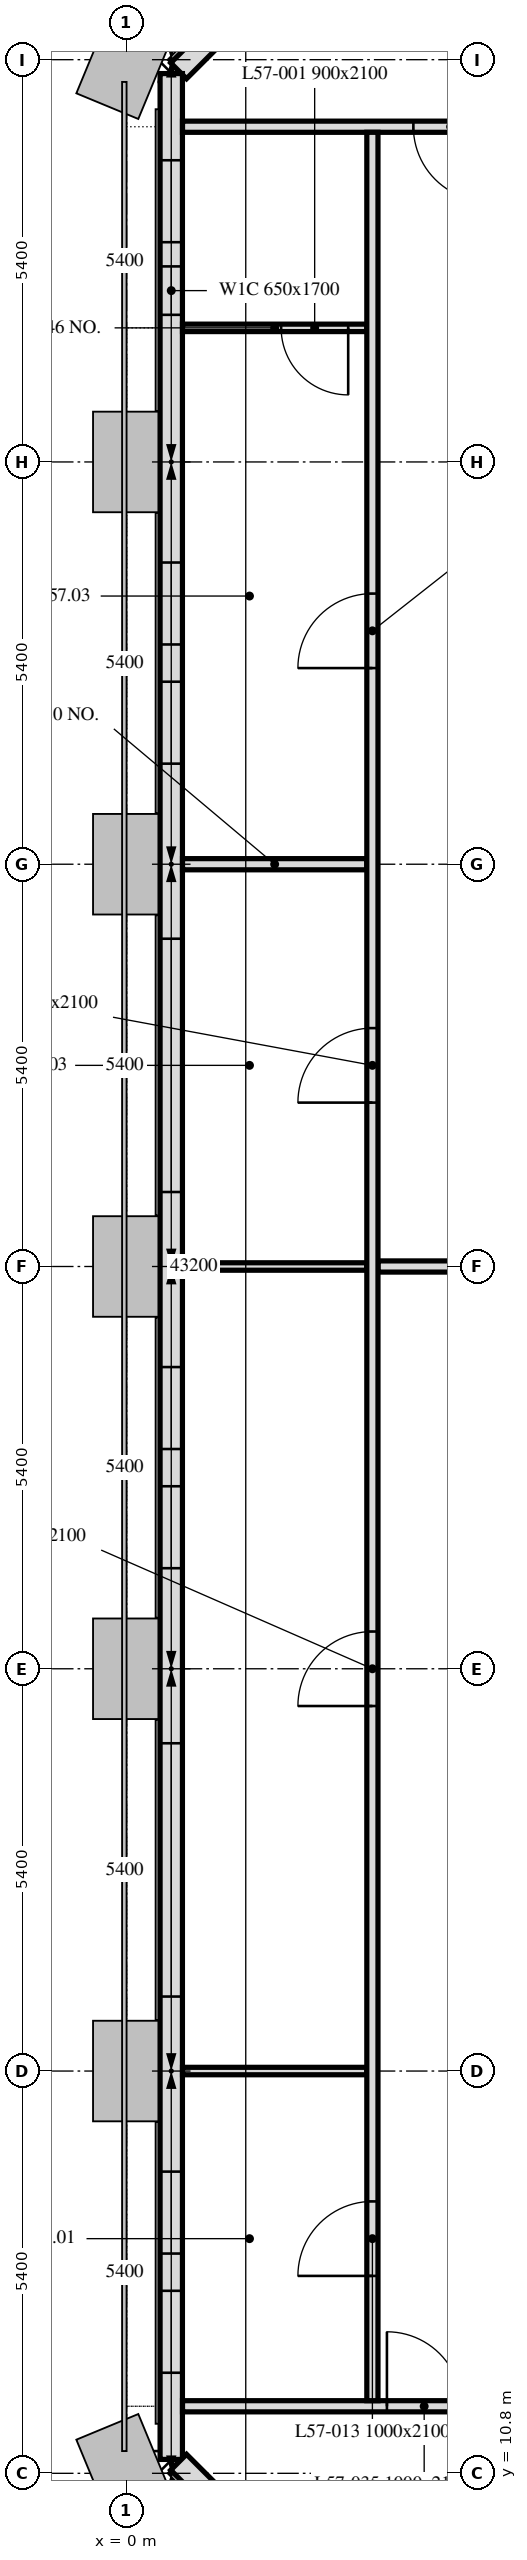
"""IFC4 building model, lengths in metres.
Left out: names, types, materials, properties, quantities, classifications, styles, units other than length and angle.
Written with IfcOpenShell. Run it as: python <this file> out.ifc"""

import sys

from ifc_helpers import new_model, si_unit, direction, frame, frame_2d, origin, place, context, subcontext, project, spatial, rectangle, extrude, element, fill, save


model = new_model("IFC4")
c1 = context("Model", 3, precision=1e-05, world=origin(), true_north=direction((0.0, 1.0)))
c2 = subcontext(c1, "Body", "Model", "MODEL_VIEW")
j1 = project(units=[si_unit("LENGTHUNIT", "METRE"), si_unit("PLANEANGLEUNIT", "RADIAN")], contexts=[c1])
p1 = place(None, origin())
s1 = spatial("IfcSite", under=j1, at=p1, CompositionType="ELEMENT")
p2 = place(p1, origin())
s2 = spatial("IfcBuilding", under=s1, at=p2, CompositionType="ELEMENT")
p3 = place(p2, frame((0.0, 0.0, 226.9)))
s3 = spatial("IfcBuildingStorey", under=s2, at=p3, CompositionType="ELEMENT", Elevation=226.9)
p4 = place(p3, frame((5.55, 47.901, 0.0), z_axis=(0.0, 0.0, 1.0), x_axis=(-0.707106781187, -0.707106781187, 0.0)))
e1 = element("IfcWall", 1, at=p4, inside=s3, PredefinedType="SOLIDWALL", context=c2, shape_type="SweptSolid", body=[
    extrude(rectangle(XDim=6.86, YDim=0.3, at=frame_2d((3.43, 0.0))), origin(), (0.0, 0.0, 1.0), 3.0),
])
p5 = place(p4, frame((1.73, 0.0, 0.9)))
e2 = element("IfcOpeningElement", 2, at=p5, cuts=e1, PredefinedType="OPENING", context=c2, shape_type="SweptSolid", body=[
    extrude(rectangle(XDim=3.4, YDim=1.7, at=frame_2d((1.7, 0.85))), frame((0.0, 0.16, 0.0), z_axis=(0.0, -1.0, 0.0), x_axis=(1.0, 0.0, 0.0)), (0.0, 0.0, 1.0), 0.32),
])
p6 = place(p3, frame((0.6, 43.014, 0.0), z_axis=(0.0, 0.0, 1.0), x_axis=(0.0, -1.0, 0.0)))
e3 = element("IfcWall", 3, at=p6, inside=s3, PredefinedType="SOLIDWALL", context=c2, shape_type="SweptSolid", body=[
    extrude(rectangle(XDim=32.027, YDim=0.3, at=frame_2d((16.014, 0.0))), origin(), (0.0, 0.0, 1.0), 3.0),
])
p7 = place(p6, frame((1.164, 0.0, 0.9)))
e4 = element("IfcOpeningElement", 4, at=p7, cuts=e3, PredefinedType="OPENING", context=c2, shape_type="SweptSolid", body=[
    extrude(rectangle(XDim=1.1, YDim=1.7, at=frame_2d((0.55, 0.85))), frame((0.0, 0.16, 0.0), z_axis=(0.0, -1.0, 0.0), x_axis=(1.0, 0.0, 0.0)), (0.0, 0.0, 1.0), 0.32),
])
p8 = place(p6, frame((2.589, 0.0, 0.9)))
e5 = element("IfcOpeningElement", 5, at=p8, cuts=e3, PredefinedType="OPENING", context=c2, shape_type="SweptSolid", body=[
    extrude(rectangle(XDim=0.65, YDim=1.7, at=frame_2d((0.325, 0.85))), frame((0.0, 0.16, 0.0), z_axis=(0.0, -1.0, 0.0), x_axis=(1.0, 0.0, 0.0)), (0.0, 0.0, 1.0), 0.32),
])
p9 = place(p6, frame((6.564, 0.0, 0.9)))
e6 = element("IfcOpeningElement", 6, at=p9, cuts=e3, PredefinedType="OPENING", context=c2, shape_type="SweptSolid", body=[
    extrude(rectangle(XDim=1.1, YDim=1.7, at=frame_2d((0.55, 0.85))), frame((0.0, 0.16, 0.0), z_axis=(0.0, -1.0, 0.0), x_axis=(1.0, 0.0, 0.0)), (0.0, 0.0, 1.0), 0.32),
])
p10 = place(p6, frame((8.164, 0.0, 0.9)))
e7 = element("IfcOpeningElement", 7, at=p10, cuts=e3, PredefinedType="OPENING", context=c2, shape_type="SweptSolid", body=[
    extrude(rectangle(XDim=1.1, YDim=1.7, at=frame_2d((0.55, 0.85))), frame((0.0, 0.16, 0.0), z_axis=(0.0, -1.0, 0.0), x_axis=(1.0, 0.0, 0.0)), (0.0, 0.0, 1.0), 0.32),
])
p11 = place(p6, frame((11.614, 0.0, 0.9)))
e8 = element("IfcOpeningElement", 8, at=p11, cuts=e3, PredefinedType="OPENING", context=c2, shape_type="SweptSolid", body=[
    extrude(rectangle(XDim=3.4, YDim=1.7, at=frame_2d((1.7, 0.85))), frame((0.0, 0.16, 0.0), z_axis=(0.0, -1.0, 0.0), x_axis=(1.0, 0.0, 0.0)), (0.0, 0.0, 1.0), 0.32),
])
p12 = place(p6, frame((17.364, 0.0, 0.9)))
e9 = element("IfcOpeningElement", 9, at=p12, cuts=e3, PredefinedType="OPENING", context=c2, shape_type="SweptSolid", body=[
    extrude(rectangle(XDim=1.1, YDim=1.7, at=frame_2d((0.55, 0.85))), frame((0.0, 0.16, 0.0), z_axis=(0.0, -1.0, 0.0), x_axis=(1.0, 0.0, 0.0)), (0.0, 0.0, 1.0), 0.32),
])
p13 = place(p6, frame((18.964, 0.0, 0.9)))
e10 = element("IfcOpeningElement", 10, at=p13, cuts=e3, PredefinedType="OPENING", context=c2, shape_type="SweptSolid", body=[
    extrude(rectangle(XDim=1.1, YDim=1.7, at=frame_2d((0.55, 0.85))), frame((0.0, 0.16, 0.0), z_axis=(0.0, -1.0, 0.0), x_axis=(1.0, 0.0, 0.0)), (0.0, 0.0, 1.0), 0.32),
])
p14 = place(p6, frame((22.414, 0.0, 0.9)))
e11 = element("IfcOpeningElement", 11, at=p14, cuts=e3, PredefinedType="OPENING", context=c2, shape_type="SweptSolid", body=[
    extrude(rectangle(XDim=3.4, YDim=1.7, at=frame_2d((1.7, 0.85))), frame((0.0, 0.16, 0.0), z_axis=(0.0, -1.0, 0.0), x_axis=(1.0, 0.0, 0.0)), (0.0, 0.0, 1.0), 0.32),
])
p15 = place(p6, frame((28.164, 0.0, 0.9)))
e12 = element("IfcOpeningElement", 12, at=p15, cuts=e3, PredefinedType="OPENING", context=c2, shape_type="SweptSolid", body=[
    extrude(rectangle(XDim=1.1, YDim=1.7, at=frame_2d((0.55, 0.85))), frame((0.0, 0.16, 0.0), z_axis=(0.0, -1.0, 0.0), x_axis=(1.0, 0.0, 0.0)), (0.0, 0.0, 1.0), 0.32),
])
p16 = place(p6, frame((29.764, 0.0, 0.9)))
e13 = element("IfcOpeningElement", 13, at=p16, cuts=e3, PredefinedType="OPENING", context=c2, shape_type="SweptSolid", body=[
    extrude(rectangle(XDim=1.1, YDim=1.7, at=frame_2d((0.55, 0.85))), frame((0.0, 0.16, 0.0), z_axis=(0.0, -1.0, 0.0), x_axis=(1.0, 0.0, 0.0)), (0.0, 0.0, 1.0), 0.32),
])
p17 = place(p3, frame((0.699, 10.949, 0.0), z_axis=(0.0, 0.0, 1.0), x_axis=(0.707106781187, -0.707106781187, 0.0)))
e14 = element("IfcWall", 14, at=p17, inside=s3, PredefinedType="SOLIDWALL", context=c2, shape_type="SweptSolid", body=[
    extrude(rectangle(XDim=6.86, YDim=0.3, at=frame_2d((3.43, 0.0))), origin(), (0.0, 0.0, 1.0), 3.0),
])
p18 = place(p17, frame((1.73, 0.0, 0.9)))
e15 = element("IfcOpeningElement", 15, at=p18, cuts=e14, PredefinedType="OPENING", context=c2, shape_type="SweptSolid", body=[
    extrude(rectangle(XDim=3.4, YDim=1.7, at=frame_2d((1.7, 0.85))), frame((0.0, 0.16, 0.0), z_axis=(0.0, -1.0, 0.0), x_axis=(1.0, 0.0, 0.0)), (0.0, 0.0, 1.0), 0.32),
])
p19 = place(p3, frame((0.751, 32.4, 0.0), z_axis=(0.0, 0.0, 1.0), x_axis=(1.0, 0.0, 0.0)))
e16 = element("IfcWall", 16, at=p19, inside=s3, PredefinedType="PARTITIONING", context=c2, shape_type="SweptSolid", body=[
    extrude(rectangle(XDim=2.474, YDim=0.15, at=frame_2d((1.237, 0.0))), origin(), (0.0, 0.0, 1.0), 2.4),
])
p20 = place(p3, frame((3.225, 39.6, 0.0), z_axis=(0.0, 0.0, 1.0), x_axis=(-1.0, 0.0, 0.0)))
e17 = element("IfcWall", 17, at=p20, inside=s3, PredefinedType="PARTITIONING", context=c2, shape_type="SweptSolid", body=[
    extrude(rectangle(XDim=2.474, YDim=0.1, at=frame_2d((1.237, 0.0))), origin(), (0.0, 0.0, 1.0), 3.0),
])
p21 = place(p20, frame((0.25, 0.0, 0.0)))
e18 = element("IfcOpeningElement", 18, at=p21, cuts=e17, PredefinedType="OPENING", context=c2, shape_type="SweptSolid", body=[
    extrude(rectangle(XDim=0.9, YDim=2.1, at=frame_2d((0.45, 1.05))), frame((0.0, 0.05, 0.0), z_axis=(0.0, -1.0, 0.0), x_axis=(1.0, 0.0, 0.0)), (0.0, 0.0, 1.0), 0.1),
])
p22 = place(p3, frame((42.449, 42.3, 0.0), z_axis=(0.0, 0.0, 1.0), x_axis=(-1.0, 0.0, 0.0)))
e19 = element("IfcWall", 19, at=p22, inside=s3, PredefinedType="PARTITIONING", context=c2, shape_type="SweptSolid", body=[
    extrude(rectangle(XDim=41.698, YDim=0.15, at=frame_2d((20.849, 0.0))), origin(), (0.0, 0.0, 1.0), 2.4),
])
p23 = place(p22, frame((1.132, 0.0, 0.0)))
e20 = element("IfcOpeningElement", 20, at=p23, cuts=e19, PredefinedType="OPENING", context=c2, shape_type="SweptSolid", body=[
    extrude(rectangle(XDim=1.0, YDim=2.1, at=frame_2d((0.5, 1.05))), frame((0.0, 0.075, 0.0), z_axis=(0.0, -1.0, 0.0), x_axis=(1.0, 0.0, 0.0)), (0.0, 0.0, 1.0), 0.15),
])
p24 = place(p22, frame((13.049, 0.0, 0.0)))
e21 = element("IfcOpeningElement", 21, at=p24, cuts=e19, PredefinedType="OPENING", context=c2, shape_type="SweptSolid", body=[
    extrude(rectangle(XDim=1.0, YDim=2.1, at=frame_2d((0.5, 1.05))), frame((0.0, 0.075, 0.0), z_axis=(0.0, -1.0, 0.0), x_axis=(1.0, 0.0, 0.0)), (0.0, 0.0, 1.0), 0.15),
])
p25 = place(p22, frame((18.449, 0.0, 0.0)))
e22 = element("IfcOpeningElement", 22, at=p25, cuts=e19, PredefinedType="OPENING", context=c2, shape_type="SweptSolid", body=[
    extrude(rectangle(XDim=1.0, YDim=2.1, at=frame_2d((0.5, 1.05))), frame((0.0, 0.075, 0.0), z_axis=(0.0, -1.0, 0.0), x_axis=(1.0, 0.0, 0.0)), (0.0, 0.0, 1.0), 0.15),
])
p26 = place(p22, frame((23.049, 0.0, 0.0)))
e23 = element("IfcOpeningElement", 23, at=p26, cuts=e19, PredefinedType="OPENING", context=c2, shape_type="SweptSolid", body=[
    extrude(rectangle(XDim=1.0, YDim=2.1, at=frame_2d((0.5, 1.05))), frame((0.0, 0.075, 0.0), z_axis=(0.0, -1.0, 0.0), x_axis=(1.0, 0.0, 0.0)), (0.0, 0.0, 1.0), 0.15),
])
p27 = place(p22, frame((37.599, 0.0, 0.0)))
e24 = element("IfcOpeningElement", 24, at=p27, cuts=e19, PredefinedType="OPENING", context=c2, shape_type="SweptSolid", body=[
    extrude(rectangle(XDim=1.0, YDim=2.1, at=frame_2d((0.5, 1.05))), frame((0.0, 0.075, 0.0), z_axis=(0.0, -1.0, 0.0), x_axis=(1.0, 0.0, 0.0)), (0.0, 0.0, 1.0), 0.15),
])
p28 = place(p3, frame((0.751, 27.0, 0.0), z_axis=(0.0, 0.0, 1.0), x_axis=(1.0, 0.0, 0.0)))
e25 = element("IfcWall", 25, at=p28, inside=s3, PredefinedType="PARTITIONING", context=c2, shape_type="SweptSolid", body=[
    extrude(rectangle(XDim=2.474, YDim=0.1, at=frame_2d((1.237, 0.0))), origin(), (0.0, 0.0, 1.0), 2.4),
])
p29 = place(p3, frame((3.375, 27.0, 0.0), z_axis=(0.0, 0.0, 1.0), x_axis=(1.0, 0.0, 0.0)))
e26 = element("IfcWall", 26, at=p29, inside=s3, PredefinedType="PARTITIONING", context=c2, shape_type="SweptSolid", body=[
    extrude(rectangle(XDim=2.025, YDim=0.15, at=frame_2d((1.012, 0.0))), origin(), (0.0, 0.0, 1.0), 2.4),
])
p30 = place(p3, frame((3.225, 16.2, 0.0), z_axis=(0.0, 0.0, 1.0), x_axis=(-1.0, 0.0, 0.0)))
e27 = element("IfcWall", 27, at=p30, inside=s3, PredefinedType="PARTITIONING", context=c2, shape_type="SweptSolid", body=[
    extrude(rectangle(XDim=2.474, YDim=0.1, at=frame_2d((1.237, 0.0))), origin(), (0.0, 0.0, 1.0), 2.4),
])
p31 = place(p3, frame((0.751, 11.7, 0.0), z_axis=(0.0, 0.0, 1.0), x_axis=(1.0, 0.0, 0.0)))
e28 = element("IfcWall", 28, at=p31, inside=s3, PredefinedType="PARTITIONING", context=c2, shape_type="SweptSolid", body=[
    extrude(rectangle(XDim=41.698, YDim=0.15, at=frame_2d((20.849, 0.0))), origin(), (0.0, 0.0, 1.0), 3.0),
])
p32 = place(p31, frame((33.866, 0.0, 0.0)))
e29 = element("IfcOpeningElement", 29, at=p32, cuts=e28, PredefinedType="OPENING", context=c2, shape_type="SweptSolid", body=[
    extrude(rectangle(XDim=1.0, YDim=2.1, at=frame_2d((0.5, 1.05))), frame((0.0, 0.075, 0.0), z_axis=(0.0, -1.0, 0.0), x_axis=(1.0, 0.0, 0.0)), (0.0, 0.0, 1.0), 0.15),
])
p33 = place(p31, frame((28.432, 0.0, 0.0)))
e30 = element("IfcOpeningElement", 30, at=p33, cuts=e28, PredefinedType="OPENING", context=c2, shape_type="SweptSolid", body=[
    extrude(rectangle(XDim=1.0, YDim=2.1, at=frame_2d((0.5, 1.05))), frame((0.0, 0.075, 0.0), z_axis=(0.0, -1.0, 0.0), x_axis=(1.0, 0.0, 0.0)), (0.0, 0.0, 1.0), 0.15),
])
p34 = place(p31, frame((12.266, 0.0, 0.0)))
e31 = element("IfcOpeningElement", 31, at=p34, cuts=e28, PredefinedType="OPENING", context=c2, shape_type="SweptSolid", body=[
    extrude(rectangle(XDim=1.0, YDim=2.1, at=frame_2d((0.5, 1.05))), frame((0.0, 0.075, 0.0), z_axis=(0.0, -1.0, 0.0), x_axis=(1.0, 0.0, 0.0)), (0.0, 0.0, 1.0), 0.15),
])
p35 = place(p31, frame((2.744, 0.0, 0.0)))
e32 = element("IfcOpeningElement", 32, at=p35, cuts=e28, PredefinedType="OPENING", context=c2, shape_type="SweptSolid", body=[
    extrude(rectangle(XDim=1.0, YDim=2.1, at=frame_2d((0.5, 1.05))), frame((0.0, 0.075, 0.0), z_axis=(0.0, -1.0, 0.0), x_axis=(1.0, 0.0, 0.0)), (0.0, 0.0, 1.0), 0.15),
])
p36 = place(p3, frame((3.3, 11.775, 0.0), z_axis=(0.0, 0.0, 1.0), x_axis=(0.0, 1.0, 0.0)))
e33 = element("IfcWall", 33, at=p36, inside=s3, PredefinedType="PARTITIONING", context=c2, shape_type="SweptSolid", body=[
    extrude(rectangle(XDim=30.45, YDim=0.15, at=frame_2d((15.225, 0.0))), origin(), (0.0, 0.0, 1.0), 2.4),
])
p37 = place(p36, frame((17.425, 0.0, 0.0)))
e34 = element("IfcOpeningElement", 34, at=p37, cuts=e33, PredefinedType="OPENING", context=c2, shape_type="SweptSolid", body=[
    extrude(rectangle(XDim=1.0, YDim=2.1, at=frame_2d((0.5, 1.05))), frame((0.0, 0.075, 0.0), z_axis=(0.0, -1.0, 0.0), x_axis=(1.0, 0.0, 0.0)), (0.0, 0.0, 1.0), 0.15),
])
p38 = place(p36, frame((1.675, 0.0, 0.0)))
e35 = element("IfcOpeningElement", 35, at=p38, cuts=e33, PredefinedType="OPENING", context=c2, shape_type="SweptSolid", body=[
    extrude(rectangle(XDim=1.0, YDim=2.1, at=frame_2d((0.5, 1.05))), frame((0.0, 0.075, 0.0), z_axis=(0.0, -1.0, 0.0), x_axis=(1.0, 0.0, 0.0)), (0.0, 0.0, 1.0), 0.15),
])
p39 = place(p36, frame((9.325, 0.0, 0.0)))
e36 = element("IfcOpeningElement", 36, at=p39, cuts=e33, PredefinedType="OPENING", context=c2, shape_type="SweptSolid", body=[
    extrude(rectangle(XDim=1.0, YDim=2.1, at=frame_2d((0.5, 1.05))), frame((0.0, 0.075, 0.0), z_axis=(0.0, -1.0, 0.0), x_axis=(1.0, 0.0, 0.0)), (0.0, 0.0, 1.0), 0.15),
])
p40 = place(p36, frame((23.258, 0.0, 0.0)))
e37 = element("IfcOpeningElement", 37, at=p40, cuts=e33, PredefinedType="OPENING", context=c2, shape_type="SweptSolid", body=[
    extrude(rectangle(XDim=1.0, YDim=2.1, at=frame_2d((0.5, 1.05))), frame((0.0, 0.075, 0.0), z_axis=(0.0, -1.0, 0.0), x_axis=(1.0, 0.0, 0.0)), (0.0, 0.0, 1.0), 0.15),
])
p41 = place(p7, origin())
e38 = element("IfcWindow", 38, at=p41, inside=s3, PartitioningType="SINGLE_PANEL", PredefinedType="WINDOW", context=c2, shape_type="SweptSolid", body=[
    extrude(rectangle(XDim=1.1, YDim=1.7, at=frame_2d((0.55, 0.85))), frame((0.0, 0.03, 0.0), z_axis=(0.0, -1.0, 0.0), x_axis=(1.0, 0.0, 0.0)), (0.0, 0.0, 1.0), 0.06),
])
fill(e4, e38)
p42 = place(p8, origin())
e39 = element("IfcWindow", 39, at=p42, inside=s3, PartitioningType="SINGLE_PANEL", PredefinedType="WINDOW", context=c2, shape_type="SweptSolid", body=[
    extrude(rectangle(XDim=0.65, YDim=1.7, at=frame_2d((0.325, 0.85))), frame((0.0, 0.03, 0.0), z_axis=(0.0, -1.0, 0.0), x_axis=(1.0, 0.0, 0.0)), (0.0, 0.0, 1.0), 0.06),
])
fill(e5, e39)
p43 = place(p9, origin())
e40 = element("IfcWindow", 40, at=p43, inside=s3, PartitioningType="SINGLE_PANEL", PredefinedType="WINDOW", context=c2, shape_type="SweptSolid", body=[
    extrude(rectangle(XDim=1.1, YDim=1.7, at=frame_2d((0.55, 0.85))), frame((0.0, 0.03, 0.0), z_axis=(0.0, -1.0, 0.0), x_axis=(1.0, 0.0, 0.0)), (0.0, 0.0, 1.0), 0.06),
])
fill(e6, e40)
p44 = place(p10, origin())
e41 = element("IfcWindow", 41, at=p44, inside=s3, PartitioningType="SINGLE_PANEL", PredefinedType="WINDOW", context=c2, shape_type="SweptSolid", body=[
    extrude(rectangle(XDim=1.1, YDim=1.7, at=frame_2d((0.55, 0.85))), frame((0.0, 0.03, 0.0), z_axis=(0.0, -1.0, 0.0), x_axis=(1.0, 0.0, 0.0)), (0.0, 0.0, 1.0), 0.06),
])
fill(e7, e41)
p45 = place(p11, origin())
e42 = element("IfcWindow", 42, at=p45, inside=s3, PartitioningType="SINGLE_PANEL", PredefinedType="WINDOW", context=c2, shape_type="SweptSolid", body=[
    extrude(rectangle(XDim=3.4, YDim=1.7, at=frame_2d((1.7, 0.85))), frame((0.0, 0.03, 0.0), z_axis=(0.0, -1.0, 0.0), x_axis=(1.0, 0.0, 0.0)), (0.0, 0.0, 1.0), 0.06),
])
fill(e8, e42)
p46 = place(p12, origin())
e43 = element("IfcWindow", 43, at=p46, inside=s3, PartitioningType="SINGLE_PANEL", PredefinedType="WINDOW", context=c2, shape_type="SweptSolid", body=[
    extrude(rectangle(XDim=1.1, YDim=1.7, at=frame_2d((0.55, 0.85))), frame((0.0, 0.03, 0.0), z_axis=(0.0, -1.0, 0.0), x_axis=(1.0, 0.0, 0.0)), (0.0, 0.0, 1.0), 0.06),
])
fill(e9, e43)
p47 = place(p13, origin())
e44 = element("IfcWindow", 44, at=p47, inside=s3, PartitioningType="SINGLE_PANEL", PredefinedType="WINDOW", context=c2, shape_type="SweptSolid", body=[
    extrude(rectangle(XDim=1.1, YDim=1.7, at=frame_2d((0.55, 0.85))), frame((0.0, 0.03, 0.0), z_axis=(0.0, -1.0, 0.0), x_axis=(1.0, 0.0, 0.0)), (0.0, 0.0, 1.0), 0.06),
])
fill(e10, e44)
p48 = place(p14, origin())
e45 = element("IfcWindow", 45, at=p48, inside=s3, PartitioningType="SINGLE_PANEL", PredefinedType="WINDOW", context=c2, shape_type="SweptSolid", body=[
    extrude(rectangle(XDim=3.4, YDim=1.7, at=frame_2d((1.7, 0.85))), frame((0.0, 0.03, 0.0), z_axis=(0.0, -1.0, 0.0), x_axis=(1.0, 0.0, 0.0)), (0.0, 0.0, 1.0), 0.06),
])
fill(e11, e45)
p49 = place(p15, origin())
e46 = element("IfcWindow", 46, at=p49, inside=s3, PartitioningType="SINGLE_PANEL", PredefinedType="WINDOW", context=c2, shape_type="SweptSolid", body=[
    extrude(rectangle(XDim=1.1, YDim=1.7, at=frame_2d((0.55, 0.85))), frame((0.0, 0.03, 0.0), z_axis=(0.0, -1.0, 0.0), x_axis=(1.0, 0.0, 0.0)), (0.0, 0.0, 1.0), 0.06),
])
fill(e12, e46)
p50 = place(p16, origin())
e47 = element("IfcWindow", 47, at=p50, inside=s3, PartitioningType="SINGLE_PANEL", PredefinedType="WINDOW", context=c2, shape_type="SweptSolid", body=[
    extrude(rectangle(XDim=1.1, YDim=1.7, at=frame_2d((0.55, 0.85))), frame((0.0, 0.03, 0.0), z_axis=(0.0, -1.0, 0.0), x_axis=(1.0, 0.0, 0.0)), (0.0, 0.0, 1.0), 0.06),
])
fill(e13, e47)
p51 = place(p21, origin())
e48 = element("IfcDoor", 48, at=p51, inside=s3, OperationType="SINGLE_SWING_RIGHT", PredefinedType="DOOR", context=c2, shape_type="SweptSolid", body=[
    extrude(rectangle(XDim=0.9, YDim=2.1, at=frame_2d((0.45, 1.05))), frame((0.0, 0.025, 0.0), z_axis=(0.0, -1.0, 0.0), x_axis=(1.0, 0.0, 0.0)), (0.0, 0.0, 1.0), 0.05),
])
fill(e18, e48)
p52 = place(p37, origin())
e49 = element("IfcDoor", 49, at=p52, inside=s3, OperationType="SINGLE_SWING_RIGHT", PredefinedType="DOOR", context=c2, shape_type="SweptSolid", body=[
    extrude(rectangle(XDim=1.0, YDim=2.1, at=frame_2d((0.5, 1.05))), frame((0.0, 0.025, 0.0), z_axis=(0.0, -1.0, 0.0), x_axis=(1.0, 0.0, 0.0)), (0.0, 0.0, 1.0), 0.05),
])
fill(e34, e49)
p53 = place(p38, origin())
e50 = element("IfcDoor", 50, at=p53, inside=s3, OperationType="SINGLE_SWING_LEFT", PredefinedType="DOOR", context=c2, shape_type="SweptSolid", body=[
    extrude(rectangle(XDim=1.0, YDim=2.1, at=frame_2d((0.5, 1.05))), frame((0.0, 0.025, 0.0), z_axis=(0.0, -1.0, 0.0), x_axis=(1.0, 0.0, 0.0)), (0.0, 0.0, 1.0), 0.05),
])
fill(e35, e50)
p54 = place(p39, origin())
e51 = element("IfcDoor", 51, at=p54, inside=s3, OperationType="SINGLE_SWING_RIGHT", PredefinedType="DOOR", context=c2, shape_type="SweptSolid", body=[
    extrude(rectangle(XDim=1.0, YDim=2.1, at=frame_2d((0.5, 1.05))), frame((0.0, 0.025, 0.0), z_axis=(0.0, -1.0, 0.0), x_axis=(1.0, 0.0, 0.0)), (0.0, 0.0, 1.0), 0.05),
])
fill(e36, e51)
p55 = place(p40, origin())
e52 = element("IfcDoor", 52, at=p55, inside=s3, OperationType="SINGLE_SWING_RIGHT", PredefinedType="DOOR", context=c2, shape_type="SweptSolid", body=[
    extrude(rectangle(XDim=1.0, YDim=2.1, at=frame_2d((0.5, 1.05))), frame((0.0, 0.025, 0.0), z_axis=(0.0, -1.0, 0.0), x_axis=(1.0, 0.0, 0.0)), (0.0, 0.0, 1.0), 0.05),
])
fill(e37, e52)
p56 = place(p27, origin())
e53 = element("IfcDoor", 53, at=p56, inside=s3, OperationType="SINGLE_SWING_RIGHT", PredefinedType="DOOR", context=c2, shape_type="SweptSolid", body=[
    extrude(rectangle(XDim=1.0, YDim=2.1, at=frame_2d((0.5, 1.05))), frame((0.0, 0.025, 0.0), z_axis=(0.0, -1.0, 0.0), x_axis=(1.0, 0.0, 0.0)), (0.0, 0.0, 1.0), 0.05),
])
fill(e24, e53)
p57 = place(p35, origin())
e54 = element("IfcDoor", 54, at=p57, inside=s3, OperationType="SINGLE_SWING_RIGHT", PredefinedType="DOOR", context=c2, shape_type="SweptSolid", body=[
    extrude(rectangle(XDim=1.0, YDim=2.1, at=frame_2d((0.5, 1.05))), frame((0.0, 0.025, 0.0), z_axis=(0.0, -1.0, 0.0), x_axis=(1.0, 0.0, 0.0)), (0.0, 0.0, 1.0), 0.05),
])
fill(e32, e54)
save(model, sys.argv[1])
